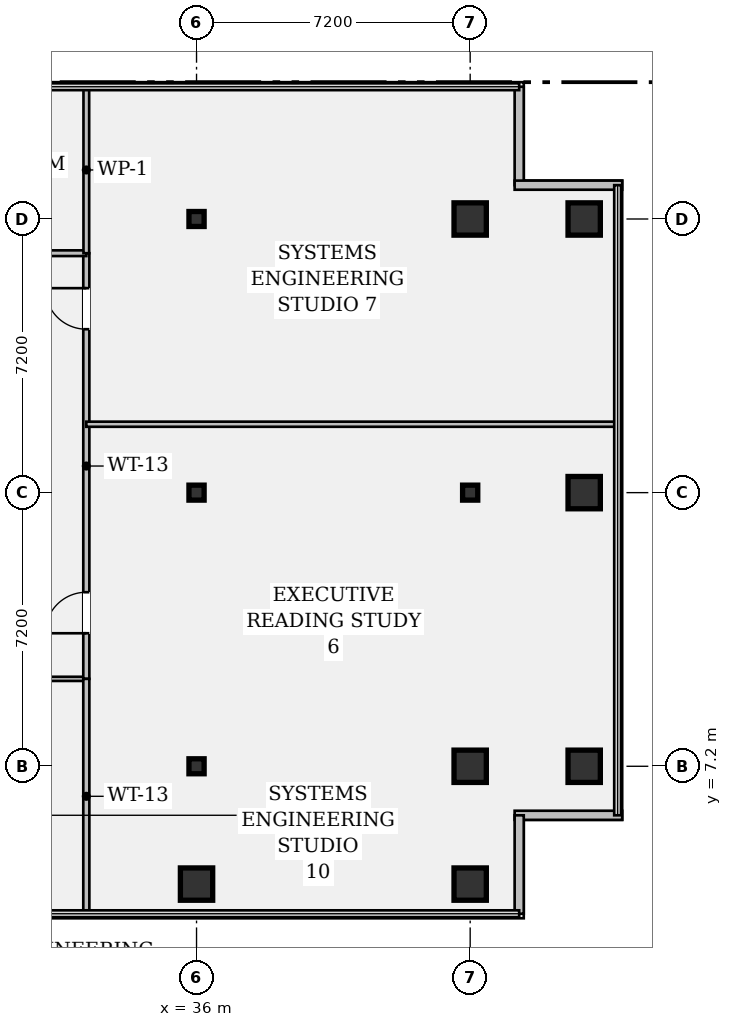
"""IFC4 building model, lengths in metres.
Left out: names, types, materials, properties, quantities, classifications, styles, units other than length and angle.
Written with IfcOpenShell. Run it as: python <this file> out.ifc"""

import sys

from ifc_helpers import new_model, si_unit, direction, frame, frame_2d, origin, origin_2d, place, context, subcontext, project, spatial, rectangle, hollow_rectangle, i_section, extrude, element, fill, save


model = new_model("IFC4")
c1 = context("Model", 3, precision=1e-05, world=origin(), true_north=direction((0.0, 1.0)))
c2 = subcontext(c1, "Body", "Model", "MODEL_VIEW")
j1 = project(units=[si_unit("LENGTHUNIT", "METRE"), si_unit("PLANEANGLEUNIT", "RADIAN")], contexts=[c1])
p1 = place(None, origin())
s1 = spatial("IfcSite", under=j1, at=p1, CompositionType="ELEMENT")
p2 = place(p1, origin())
s2 = spatial("IfcBuilding", under=s1, at=p2, CompositionType="ELEMENT")
p3 = place(p2, frame((0.0, 0.0, 148.4)))
s3 = spatial("IfcBuildingStorey", under=s2, at=p3, CompositionType="ELEMENT", Elevation=148.4)
p4 = place(p3, frame((36.0, 4.1, 0.0), z_axis=(0.0, 0.0, 1.0), x_axis=(1.0, 0.0, 0.0)))
e1 = element("IfcColumn", 1, at=p4, inside=s3, PredefinedType="COLUMN", context=c2, shape_type="SweptSolid", body=[
    extrude(hollow_rectangle(XDim=0.85, YDim=0.85, WallThickness=0.05, at=origin_2d()), origin(), (0.0, 0.0, 1.0), 3.58),
])
for number, where, z_axis, x_axis in (
    (2, (36.0, 7.2, 0.0), (0.0, 0.0, 1.0), (1.0, 0.0, 0.0)),
    (3, (36.0, 14.4, 0.0), (0.0, 0.0, 1.0), (1.0, 0.0, 0.0)),
    (4, (36.0, 21.6, 0.0), (0.0, 0.0, 1.0), (1.0, 0.0, 0.0)),
):
    element("IfcColumn", number, at=place(p3, frame(where, z_axis=z_axis, x_axis=x_axis)), inside=s3, PredefinedType="COLUMN", context=c2, shape_type="SweptSolid", body=[
        extrude(i_section(OverallWidth=0.399, OverallDepth=0.394, WebThickness=0.023, FlangeThickness=0.037, FilletRadius=0.018, at=origin_2d()), origin(), (0.0, 0.0, 1.0), 3.58),
    ])
for number, where, z_axis, x_axis in (
    (5, (43.2, 4.1, 0.0), (0.0, 0.0, 1.0), (1.0, 0.0, 0.0)),
    (6, (43.2, 7.2, 0.0), (0.0, 0.0, 1.0), (1.0, 0.0, 0.0)),
):
    element("IfcColumn", number, at=place(p3, frame(where, z_axis=z_axis, x_axis=x_axis)), inside=s3, PredefinedType="COLUMN", context=c2, shape_type="SweptSolid", body=[
        extrude(hollow_rectangle(XDim=0.85, YDim=0.85, WallThickness=0.05, at=origin_2d()), origin(), (0.0, 0.0, 1.0), 3.58),
    ])
p5 = place(p3, frame((43.2, 14.4, 0.0), z_axis=(0.0, 0.0, 1.0), x_axis=(1.0, 0.0, 0.0)))
e7 = element("IfcColumn", 7, at=p5, inside=s3, PredefinedType="COLUMN", context=c2, shape_type="SweptSolid", body=[
    extrude(i_section(OverallWidth=0.399, OverallDepth=0.394, WebThickness=0.023, FlangeThickness=0.037, FilletRadius=0.018, at=origin_2d()), origin(), (0.0, 0.0, 1.0), 3.58),
])
for number, where, z_axis, x_axis in (
    (8, (43.2, 21.6, 0.0), (0.0, 0.0, 1.0), (1.0, 0.0, 0.0)),
    (9, (46.2, 7.2, 0.0), (0.0, 0.0, 1.0), (1.0, 0.0, 0.0)),
    (10, (46.2, 14.4, 0.0), (0.0, 0.0, 1.0), (1.0, 0.0, 0.0)),
    (11, (46.2, 21.6, 0.0), (0.0, 0.0, 1.0), (1.0, 0.0, 0.0)),
):
    element("IfcColumn", number, at=place(p3, frame(where, z_axis=z_axis, x_axis=x_axis)), inside=s3, PredefinedType="COLUMN", context=c2, shape_type="SweptSolid", body=[
        extrude(hollow_rectangle(XDim=0.85, YDim=0.85, WallThickness=0.05, at=origin_2d()), origin(), (0.0, 0.0, 1.0), 3.58),
    ])
p6 = place(p3, frame((44.49, 25.08, 0.0), z_axis=(0.0, 0.0, 1.0), x_axis=(0.0, -1.0, 0.0)))
e12 = element("IfcWall", 12, at=p6, inside=s3, PredefinedType="STANDARD", context=c2, shape_type="SweptSolid", body=[
    extrude(rectangle(XDim=2.59, YDim=0.24, at=frame_2d((1.295, 0.0))), origin(), (0.0, 0.0, 1.0), 3.58),
])
for number, where, z_axis, x_axis in (
    (13, (44.37, 22.49, 0.0), (0.0, 0.0, 1.0), (1.0, 0.0, 0.0)),
    (14, (47.2, 5.91, 0.0), (0.0, 0.0, 1.0), (-1.0, 0.0, 0.0)),
):
    element("IfcWall", number, at=place(p3, frame(where, z_axis=z_axis, x_axis=x_axis)), inside=s3, PredefinedType="STANDARD", context=c2, shape_type="SweptSolid", body=[
        extrude(rectangle(XDim=2.83, YDim=0.24, at=frame_2d((1.415, 0.0))), origin(), (0.0, 0.0, 1.0), 3.58),
    ])
p7 = place(p3, frame((44.49, 5.91, 0.0), z_axis=(0.0, 0.0, 1.0), x_axis=(0.0, -1.0, 0.0)))
e15 = element("IfcWall", 15, at=p7, inside=s3, PredefinedType="STANDARD", context=c2, shape_type="SweptSolid", body=[
    extrude(rectangle(XDim=2.59, YDim=0.24, at=frame_2d((1.295, 0.0))), origin(), (0.0, 0.0, 1.0), 3.58),
])
p8 = place(p3, frame((17.35, 9.5, 0.0), z_axis=(0.0, 0.0, 1.0), x_axis=(1.0, 0.0, 0.0)))
e16 = element("IfcWall", 16, at=p8, inside=s3, PredefinedType="PARTITIONING", context=c2, shape_type="SweptSolid", body=[
    extrude(rectangle(XDim=15.75, YDim=0.11, at=frame_2d((7.875, 0.0))), origin(), (0.0, 0.0, 1.0), 2.869),
])
p9 = place(p8, frame((3.73, 0.0, 0.0)))
e17 = element("IfcOpeningElement", 17, at=p9, cuts=e16, PredefinedType="OPENING", context=c2, shape_type="SweptSolid", body=[
    extrude(rectangle(XDim=1.08, YDim=2.15, at=frame_2d((0.54, 1.075))), frame((0.0, 0.067, 0.0), z_axis=(0.0, -1.0, 0.0), x_axis=(1.0, 0.0, 0.0)), (0.0, 0.0, 1.0), 0.134),
])
p10 = place(p8, frame((11.6, 0.0, 0.0)))
e18 = element("IfcOpeningElement", 18, at=p10, cuts=e16, PredefinedType="OPENING", context=c2, shape_type="SweptSolid", body=[
    extrude(rectangle(XDim=1.08, YDim=2.15, at=frame_2d((0.54, 1.075))), frame((0.0, 0.067, 0.0), z_axis=(0.0, -1.0, 0.0), x_axis=(1.0, 0.0, 0.0)), (0.0, 0.0, 1.0), 0.134),
])
p11 = place(p3, frame((33.1, 9.5, 0.0), z_axis=(0.0, 0.0, 1.0), x_axis=(0.0, 1.0, 0.0)))
e19 = element("IfcWall", 19, at=p11, inside=s3, PredefinedType="PARTITIONING", context=c2, shape_type="SweptSolid", body=[
    extrude(rectangle(XDim=11.2, YDim=0.16, at=frame_2d((5.6, 0.0))), origin(), (0.0, 0.0, 1.0), 2.869),
])
p12 = place(p11, frame((1.2, 0.0, 0.0)))
e20 = element("IfcOpeningElement", 20, at=p12, cuts=e19, PredefinedType="OPENING", context=c2, shape_type="SweptSolid", body=[
    extrude(rectangle(XDim=1.08, YDim=2.15, at=frame_2d((0.54, 1.075))), frame((0.0, 0.092, 0.0), z_axis=(0.0, -1.0, 0.0), x_axis=(1.0, 0.0, 0.0)), (0.0, 0.0, 1.0), 0.184),
])
p13 = place(p11, frame((9.2, 0.0, 0.0)))
e21 = element("IfcOpeningElement", 21, at=p13, cuts=e19, PredefinedType="OPENING", context=c2, shape_type="SweptSolid", body=[
    extrude(rectangle(XDim=1.08, YDim=2.15, at=frame_2d((0.54, 1.075))), frame((0.0, 0.092, 0.0), z_axis=(0.0, -1.0, 0.0), x_axis=(1.0, 0.0, 0.0)), (0.0, 0.0, 1.0), 0.184),
])
p14 = place(p3, frame((17.35, 20.7, 0.0), z_axis=(0.0, 0.0, 1.0), x_axis=(1.0, 0.0, 0.0)))
e22 = element("IfcWall", 22, at=p14, inside=s3, PredefinedType="PARTITIONING", context=c2, shape_type="SweptSolid", body=[
    extrude(rectangle(XDim=15.75, YDim=0.15, at=frame_2d((7.875, 0.0))), origin(), (0.0, 0.0, 1.0), 2.869),
])
p15 = place(p14, frame((0.85, 0.0, 0.0)))
e23 = element("IfcOpeningElement", 23, at=p15, cuts=e22, PredefinedType="OPENING", context=c2, shape_type="SweptSolid", body=[
    extrude(rectangle(XDim=0.85, YDim=2.15, at=frame_2d((0.425, 1.075))), frame((0.0, 0.087, 0.0), z_axis=(0.0, -1.0, 0.0), x_axis=(1.0, 0.0, 0.0)), (0.0, 0.0, 1.0), 0.174),
])
p16 = place(p14, frame((4.75, 0.0, 0.0)))
e24 = element("IfcOpeningElement", 24, at=p16, cuts=e22, PredefinedType="OPENING", context=c2, shape_type="SweptSolid", body=[
    extrude(rectangle(XDim=0.85, YDim=2.15, at=frame_2d((0.425, 1.075))), frame((0.0, 0.087, 0.0), z_axis=(0.0, -1.0, 0.0), x_axis=(1.0, 0.0, 0.0)), (0.0, 0.0, 1.0), 0.174),
])
p17 = place(p14, frame((6.81, 0.0, 0.0)))
e25 = element("IfcOpeningElement", 25, at=p17, cuts=e22, PredefinedType="OPENING", context=c2, shape_type="SweptSolid", body=[
    extrude(rectangle(XDim=0.85, YDim=2.15, at=frame_2d((0.425, 1.075))), frame((0.0, 0.087, 0.0), z_axis=(0.0, -1.0, 0.0), x_axis=(1.0, 0.0, 0.0)), (0.0, 0.0, 1.0), 0.174),
])
p18 = place(p14, frame((9.05, 0.0, 0.0)))
e26 = element("IfcOpeningElement", 26, at=p18, cuts=e22, PredefinedType="OPENING", context=c2, shape_type="SweptSolid", body=[
    extrude(rectangle(XDim=1.08, YDim=2.15, at=frame_2d((0.54, 1.075))), frame((0.0, 0.087, 0.0), z_axis=(0.0, -1.0, 0.0), x_axis=(1.0, 0.0, 0.0)), (0.0, 0.0, 1.0), 0.174),
])
p19 = place(p3, frame((33.1, 3.32, 0.0), z_axis=(0.0, 0.0, 1.0), x_axis=(0.0, 1.0, 0.0)))
e27 = element("IfcWall", 27, at=p19, inside=s3, PredefinedType="PARTITIONING", context=c2, shape_type="SweptSolid", body=[
    extrude(rectangle(XDim=6.18, YDim=0.16, at=frame_2d((3.09, 0.0))), origin(), (0.0, 0.0, 1.0), 2.869),
])
p20 = place(p3, frame((33.1, 20.7, 0.0), z_axis=(0.0, 0.0, 1.0), x_axis=(0.0, 1.0, 0.0)))
e28 = element("IfcWall", 28, at=p20, inside=s3, PredefinedType="PARTITIONING", context=c2, shape_type="SweptSolid", body=[
    extrude(rectangle(XDim=4.38, YDim=0.15, at=frame_2d((2.19, 0.0))), origin(), (0.0, 0.0, 1.0), 2.869),
])
p21 = place(p3, frame((33.1, 16.2, 0.0), z_axis=(0.0, 0.0, 1.0), x_axis=(1.0, 0.0, 0.0)))
e29 = element("IfcWall", 29, at=p21, inside=s3, PredefinedType="PARTITIONING", context=c2, shape_type="SweptSolid", body=[
    extrude(rectangle(XDim=13.98, YDim=0.135, at=frame_2d((6.99, 0.0))), origin(), (0.0, 0.0, 1.0), 2.869),
])
p22 = place(p12, origin())
e30 = element("IfcDoor", 30, at=p22, inside=s3, OperationType="SINGLE_SWING_LEFT", PredefinedType="DOOR", context=c2, shape_type="SweptSolid", body=[
    extrude(rectangle(XDim=1.08, YDim=2.15, at=frame_2d((0.54, 1.075))), frame((0.0, 0.025, 0.0), z_axis=(0.0, -1.0, 0.0), x_axis=(1.0, 0.0, 0.0)), (0.0, 0.0, 1.0), 0.05),
])
fill(e20, e30)
p23 = place(p13, origin())
e31 = element("IfcDoor", 31, at=p23, inside=s3, OperationType="SINGLE_SWING_RIGHT", PredefinedType="DOOR", context=c2, shape_type="SweptSolid", body=[
    extrude(rectangle(XDim=1.08, YDim=2.15, at=frame_2d((0.54, 1.075))), frame((0.0, 0.025, 0.0), z_axis=(0.0, -1.0, 0.0), x_axis=(1.0, 0.0, 0.0)), (0.0, 0.0, 1.0), 0.05),
])
fill(e21, e31)
save(model, sys.argv[1])
